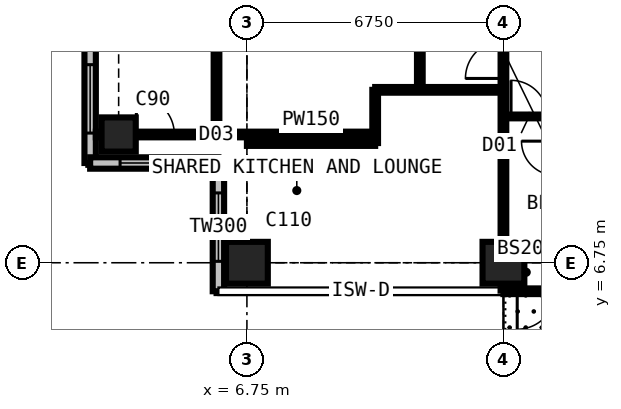
"""IFC4 building model, lengths in metres.
Left out: names, types, materials, properties, quantities, classifications, styles, units other than length and angle.
Written with IfcOpenShell. Run it as: python <this file> out.ifc"""

import sys

from ifc_helpers import new_model, si_unit, direction, frame, frame_2d, origin, origin_2d, place, context, subcontext, project, spatial, rectangle, extrude, element, fill, save


model = new_model("IFC4")
c1 = context("Model", 3, precision=1e-05, world=origin(), true_north=direction((0.0, 1.0)))
c2 = subcontext(c1, "Body", "Model", "MODEL_VIEW")
j1 = project(units=[si_unit("LENGTHUNIT", "METRE"), si_unit("PLANEANGLEUNIT", "RADIAN")], contexts=[c1])
p1 = place(None, origin())
s1 = spatial("IfcSite", under=j1, at=p1, CompositionType="ELEMENT")
p2 = place(p1, origin())
s2 = spatial("IfcBuilding", under=s1, at=p2, CompositionType="ELEMENT")
p3 = place(p2, frame((0.0, 0.0, 225.9)))
s3 = spatial("IfcBuildingStorey", under=s2, at=p3, CompositionType="ELEMENT", Elevation=225.9)
p4 = place(p3, frame((3.375, 10.125, 0.0), z_axis=(0.0, 0.0, 1.0), x_axis=(1.0, 0.0, 0.0)))
e1 = element("IfcColumn", 1, at=p4, inside=s3, PredefinedType="COLUMN", context=c2, shape_type="SweptSolid", body=[
    extrude(rectangle(XDim=0.9, YDim=0.9, at=origin_2d()), origin(), (0.0, 0.0, 1.0), 3.6),
])
for number, where, z_axis, x_axis in (
    (2, (6.75, 6.75, 0.0), (0.0, 0.0, 1.0), (1.0, 0.0, 0.0)),
    (3, (13.5, 6.75, 0.0), (0.0, 0.0, 1.0), (1.0, 0.0, 0.0)),
):
    element("IfcColumn", number, at=place(p3, frame(where, z_axis=z_axis, x_axis=x_axis)), inside=s3, PredefinedType="COLUMN", context=c2, shape_type="SweptSolid", body=[
        extrude(rectangle(XDim=1.1, YDim=1.1, at=origin_2d()), origin(), (0.0, 0.0, 1.0), 3.6),
    ])
p5 = place(p3, frame((2.625, 12.75, 0.0), z_axis=(0.0, 0.0, 1.0), x_axis=(0.0, -1.0, 0.0)))
e4 = element("IfcWall", 4, at=p5, inside=s3, PredefinedType="SOLIDWALL", context=c2, shape_type="SweptSolid", body=[
    extrude(rectangle(XDim=3.375, YDim=0.3, at=frame_2d((1.688, 0.0))), origin(), (0.0, 0.0, 1.0), 3.375),
])
p6 = place(p5, frame((0.788, 0.0, 0.6)))
e5 = element("IfcOpeningElement", 5, at=p6, cuts=e4, PredefinedType="OPENING", context=c2, shape_type="SweptSolid", body=[
    extrude(rectangle(XDim=1.8, YDim=2.1, at=frame_2d((0.9, 1.05))), frame((0.0, 0.16, 0.0), z_axis=(0.0, -1.0, 0.0), x_axis=(1.0, 0.0, 0.0)), (0.0, 0.0, 1.0), 0.32),
])
p7 = place(p3, frame((2.625, 9.375, 0.0), z_axis=(0.0, 0.0, 1.0), x_axis=(1.0, 0.0, 0.0)))
e6 = element("IfcWall", 6, at=p7, inside=s3, PredefinedType="SOLIDWALL", context=c2, shape_type="SweptSolid", body=[
    extrude(rectangle(XDim=3.375, YDim=0.3, at=frame_2d((1.688, 0.0))), origin(), (0.0, 0.0, 1.0), 3.375),
])
p8 = place(p7, frame((0.788, 0.0, 0.6)))
e7 = element("IfcOpeningElement", 7, at=p8, cuts=e6, PredefinedType="OPENING", context=c2, shape_type="SweptSolid", body=[
    extrude(rectangle(XDim=1.8, YDim=2.1, at=frame_2d((0.9, 1.05))), frame((0.0, 0.16, 0.0), z_axis=(0.0, -1.0, 0.0), x_axis=(1.0, 0.0, 0.0)), (0.0, 0.0, 1.0), 0.32),
])
p9 = place(p3, frame((6.0, 9.375, 0.0), z_axis=(0.0, 0.0, 1.0), x_axis=(0.0, -1.0, 0.0)))
e8 = element("IfcWall", 8, at=p9, inside=s3, PredefinedType="SOLIDWALL", context=c2, shape_type="SweptSolid", body=[
    extrude(rectangle(XDim=3.375, YDim=0.3, at=frame_2d((1.688, 0.0))), origin(), (0.0, 0.0, 1.0), 3.375),
])
p10 = place(p9, frame((0.788, 0.0, 0.6)))
e9 = element("IfcOpeningElement", 9, at=p10, cuts=e8, PredefinedType="OPENING", context=c2, shape_type="SweptSolid", body=[
    extrude(rectangle(XDim=1.8, YDim=2.1, at=frame_2d((0.9, 1.05))), frame((0.0, 0.16, 0.0), z_axis=(0.0, -1.0, 0.0), x_axis=(1.0, 0.0, 0.0)), (0.0, 0.0, 1.0), 0.32),
])
p11 = place(p3, frame((20.25, 6.0, 0.0), z_axis=(0.0, 0.0, 1.0), x_axis=(-1.0, 0.0, 0.0)))
e10 = element("IfcWall", 10, at=p11, inside=s3, PredefinedType="SOLIDWALL", context=c2, shape_type="SweptSolid", body=[
    extrude(rectangle(XDim=6.75, YDim=0.15, at=frame_2d((3.375, 0.0))), origin(), (0.0, 0.0, 1.0), 3.375),
])
p12 = place(p11, frame((0.363, 0.0, 0.0)))
e11 = element("IfcOpeningElement", 11, at=p12, cuts=e10, PredefinedType="OPENING", context=c2, shape_type="SweptSolid", body=[
    extrude(rectangle(XDim=1.0, YDim=2.2, at=frame_2d((0.5, 1.1))), frame((0.0, 0.085, 0.0), z_axis=(0.0, -1.0, 0.0), x_axis=(1.0, 0.0, 0.0)), (0.0, 0.0, 1.0), 0.17),
])
p13 = place(p11, frame((1.725, 0.0, 0.9)))
e12 = element("IfcOpeningElement", 12, at=p13, cuts=e10, PredefinedType="OPENING", context=c2, shape_type="SweptSolid", body=[
    extrude(rectangle(XDim=1.2, YDim=1.8, at=frame_2d((0.6, 0.9))), frame((0.0, 0.085, 0.0), z_axis=(0.0, -1.0, 0.0), x_axis=(1.0, 0.0, 0.0)), (0.0, 0.0, 1.0), 0.17),
])
p14 = place(p11, frame((5.387, 0.0, 0.0)))
e13 = element("IfcOpeningElement", 13, at=p14, cuts=e10, PredefinedType="OPENING", context=c2, shape_type="SweptSolid", body=[
    extrude(rectangle(XDim=1.0, YDim=2.2, at=frame_2d((0.5, 1.1))), frame((0.0, 0.085, 0.0), z_axis=(0.0, -1.0, 0.0), x_axis=(1.0, 0.0, 0.0)), (0.0, 0.0, 1.0), 0.17),
])
p15 = place(p11, frame((3.825, 0.0, 0.9)))
e14 = element("IfcOpeningElement", 14, at=p15, cuts=e10, PredefinedType="OPENING", context=c2, shape_type="SweptSolid", body=[
    extrude(rectangle(XDim=1.2, YDim=1.8, at=frame_2d((0.6, 0.9))), frame((0.0, 0.085, 0.0), z_axis=(0.0, -1.0, 0.0), x_axis=(1.0, 0.0, 0.0)), (0.0, 0.0, 1.0), 0.17),
])
p16 = place(p3, frame((2.775, 10.125, 0.0), z_axis=(0.0, 0.0, 1.0), x_axis=(1.0, 0.0, 0.0)))
e15 = element("IfcWall", 15, at=p16, inside=s3, PredefinedType="PARTITIONING", context=c2, shape_type="SweptSolid", body=[
    extrude(rectangle(XDim=7.35, YDim=0.15, at=frame_2d((3.675, 0.0))), origin(), (0.0, 0.0, 1.0), 2.877),
])
p17 = place(p16, frame((1.066, 0.0, 0.0)))
e16 = element("IfcOpeningElement", 16, at=p17, cuts=e15, PredefinedType="OPENING", context=c2, shape_type="SweptSolid", body=[
    extrude(rectangle(XDim=1.0, YDim=2.2, at=frame_2d((0.5, 1.1))), frame((0.0, 0.085, 0.0), z_axis=(0.0, -1.0, 0.0), x_axis=(1.0, 0.0, 0.0)), (0.0, 0.0, 1.0), 0.17),
])
p18 = place(p3, frame((5.95, 10.125, 0.0), z_axis=(0.0, 0.0, 1.0), x_axis=(0.0, 1.0, 0.0)))
e17 = element("IfcWall", 17, at=p18, inside=s3, PredefinedType="PARTITIONING", context=c2, shape_type="SweptSolid", body=[
    extrude(rectangle(XDim=2.65, YDim=0.15, at=frame_2d((1.325, 0.0))), origin(), (0.0, 0.0, 1.0), 3.375),
])
p19 = place(p3, frame((6.75, 9.9, 0.0), z_axis=(0.0, 0.0, 1.0), x_axis=(1.0, 0.0, 0.0)))
e18 = element("IfcWall", 18, at=p19, inside=s3, PredefinedType="PARTITIONING", context=c2, shape_type="SweptSolid", body=[
    extrude(rectangle(XDim=3.375, YDim=0.15, at=frame_2d((1.688, 0.0))), origin(), (0.0, 0.0, 1.0), 3.375),
])
p20 = place(p3, frame((10.125, 9.9, 0.0), z_axis=(0.0, 0.0, 1.0), x_axis=(0.0, 1.0, 0.0)))
e19 = element("IfcWall", 19, at=p20, inside=s3, PredefinedType="PARTITIONING", context=c2, shape_type="SweptSolid", body=[
    extrude(rectangle(XDim=1.4, YDim=0.15, at=frame_2d((0.7, 0.0))), origin(), (0.0, 0.0, 1.0), 3.375),
])
p21 = place(p3, frame((10.125, 11.3, 0.0), z_axis=(0.0, 0.0, 1.0), x_axis=(1.0, 0.0, 0.0)))
e20 = element("IfcWall", 20, at=p21, inside=s3, PredefinedType="PARTITIONING", context=c2, shape_type="SweptSolid", body=[
    extrude(rectangle(XDim=3.375, YDim=0.15, at=frame_2d((1.688, 0.0))), origin(), (0.0, 0.0, 1.0), 3.375),
])
p22 = place(p3, frame((11.3, 11.3, 0.0), z_axis=(0.0, 0.0, 1.0), x_axis=(0.0, 1.0, 0.0)))
e21 = element("IfcWall", 21, at=p22, inside=s3, PredefinedType="PARTITIONING", context=c2, shape_type="SweptSolid", body=[
    extrude(rectangle(XDim=19.3, YDim=0.15, at=frame_2d((9.65, 0.0))), origin(), (0.0, 0.0, 1.0), 3.375),
])
p23 = place(p22, frame((18.1, 0.0, 0.0)))
e22 = element("IfcOpeningElement", 22, at=p23, cuts=e21, PredefinedType="OPENING", context=c2, shape_type="SweptSolid", body=[
    extrude(rectangle(XDim=1.0, YDim=2.2, at=frame_2d((0.5, 1.1))), frame((0.0, 0.085, 0.0), z_axis=(0.0, -1.0, 0.0), x_axis=(1.0, 0.0, 0.0)), (0.0, 0.0, 1.0), 0.17),
])
p24 = place(p22, frame((10.137, 0.0, 0.0)))
e23 = element("IfcOpeningElement", 23, at=p24, cuts=e21, PredefinedType="OPENING", context=c2, shape_type="SweptSolid", body=[
    extrude(rectangle(XDim=1.0, YDim=2.2, at=frame_2d((0.5, 1.1))), frame((0.0, 0.085, 0.0), z_axis=(0.0, -1.0, 0.0), x_axis=(1.0, 0.0, 0.0)), (0.0, 0.0, 1.0), 0.17),
])
p25 = place(p3, frame((13.5, 6.016, 0.0), z_axis=(0.0, 0.0, 1.0), x_axis=(0.0, 1.0, 0.0)))
e24 = element("IfcWall", 24, at=p25, inside=s3, PredefinedType="PARTITIONING", context=c2, shape_type="SweptSolid", body=[
    extrude(rectangle(XDim=6.884, YDim=0.15, at=frame_2d((3.442, 0.0))), origin(), (0.0, 0.0, 1.0), 2.877),
])
p26 = place(p25, frame((5.584, 0.0, 0.0)))
e25 = element("IfcOpeningElement", 25, at=p26, cuts=e24, PredefinedType="OPENING", context=c2, shape_type="SweptSolid", body=[
    extrude(rectangle(XDim=1.0, YDim=2.2, at=frame_2d((0.5, 1.1))), frame((0.0, 0.085, 0.0), z_axis=(0.0, -1.0, 0.0), x_axis=(1.0, 0.0, 0.0)), (0.0, 0.0, 1.0), 0.17),
])
p27 = place(p3, frame((13.5, 10.6, 0.0), z_axis=(0.0, 0.0, 1.0), x_axis=(1.0, 0.0, 0.0)))
e26 = element("IfcWall", 26, at=p27, inside=s3, PredefinedType="PARTITIONING", context=c2, shape_type="SweptSolid", body=[
    extrude(rectangle(XDim=10.125, YDim=0.1, at=frame_2d((5.062, 0.0))), origin(), (0.0, 0.0, 1.0), 3.375),
])
p28 = place(p27, frame((0.2, 0.0, 0.0)))
e27 = element("IfcOpeningElement", 27, at=p28, cuts=e26, PredefinedType="OPENING", context=c2, shape_type="SweptSolid", body=[
    extrude(rectangle(XDim=0.95, YDim=2.2, at=frame_2d((0.475, 1.1))), frame((0.0, 0.06, 0.0), z_axis=(0.0, -1.0, 0.0), x_axis=(1.0, 0.0, 0.0)), (0.0, 0.0, 1.0), 0.12),
])
p29 = place(p27, frame((3.625, 0.0, 0.0)))
e28 = element("IfcOpeningElement", 28, at=p29, cuts=e26, PredefinedType="OPENING", context=c2, shape_type="SweptSolid", body=[
    extrude(rectangle(XDim=0.95, YDim=2.2, at=frame_2d((0.475, 1.1))), frame((0.0, 0.06, 0.0), z_axis=(0.0, -1.0, 0.0), x_axis=(1.0, 0.0, 0.0)), (0.0, 0.0, 1.0), 0.12),
])
p30 = place(p27, frame((6.95, 0.0, 0.0)))
e29 = element("IfcOpeningElement", 29, at=p30, cuts=e26, PredefinedType="OPENING", context=c2, shape_type="SweptSolid", body=[
    extrude(rectangle(XDim=0.95, YDim=2.2, at=frame_2d((0.475, 1.1))), frame((0.0, 0.06, 0.0), z_axis=(0.0, -1.0, 0.0), x_axis=(1.0, 0.0, 0.0)), (0.0, 0.0, 1.0), 0.12),
])
p31 = place(p6, origin())
e30 = element("IfcWindow", 30, at=p31, inside=s3, PartitioningType="SINGLE_PANEL", PredefinedType="WINDOW", context=c2, shape_type="SweptSolid", body=[
    extrude(rectangle(XDim=1.8, YDim=2.1, at=frame_2d((0.9, 1.05))), frame((0.0, 0.03, 0.0), z_axis=(0.0, -1.0, 0.0), x_axis=(1.0, 0.0, 0.0)), (0.0, 0.0, 1.0), 0.06),
])
fill(e5, e30)
p32 = place(p8, origin())
e31 = element("IfcWindow", 31, at=p32, inside=s3, PartitioningType="SINGLE_PANEL", PredefinedType="WINDOW", context=c2, shape_type="SweptSolid", body=[
    extrude(rectangle(XDim=1.8, YDim=2.1, at=frame_2d((0.9, 1.05))), frame((0.0, 0.03, 0.0), z_axis=(0.0, -1.0, 0.0), x_axis=(1.0, 0.0, 0.0)), (0.0, 0.0, 1.0), 0.06),
])
fill(e7, e31)
p33 = place(p10, origin())
e32 = element("IfcWindow", 32, at=p33, inside=s3, PartitioningType="SINGLE_PANEL", PredefinedType="WINDOW", context=c2, shape_type="SweptSolid", body=[
    extrude(rectangle(XDim=1.8, YDim=2.1, at=frame_2d((0.9, 1.05))), frame((0.0, 0.03, 0.0), z_axis=(0.0, -1.0, 0.0), x_axis=(1.0, 0.0, 0.0)), (0.0, 0.0, 1.0), 0.06),
])
fill(e9, e32)
p34 = place(p14, origin())
e33 = element("IfcDoor", 33, at=p34, inside=s3, OperationType="SINGLE_SWING_RIGHT", PredefinedType="DOOR", context=c2, shape_type="SweptSolid", body=[
    extrude(rectangle(XDim=1.0, YDim=2.2, at=frame_2d((0.5, 1.1))), frame((0.0, 0.025, 0.0), z_axis=(0.0, -1.0, 0.0), x_axis=(1.0, 0.0, 0.0)), (0.0, 0.0, 1.0), 0.05),
])
fill(e13, e33)
p35 = place(p17, origin())
e34 = element("IfcDoor", 34, at=p35, inside=s3, OperationType="SINGLE_SWING_LEFT", PredefinedType="DOOR", context=c2, shape_type="SweptSolid", body=[
    extrude(rectangle(XDim=1.0, YDim=2.2, at=frame_2d((0.5, 1.1))), frame((0.0, 0.025, 0.0), z_axis=(0.0, -1.0, 0.0), x_axis=(1.0, 0.0, 0.0)), (0.0, 0.0, 1.0), 0.05),
])
fill(e16, e34)
p36 = place(p28, origin())
e35 = element("IfcDoor", 35, at=p36, inside=s3, OperationType="SINGLE_SWING_LEFT", PredefinedType="DOOR", context=c2, shape_type="SweptSolid", body=[
    extrude(rectangle(XDim=0.95, YDim=2.2, at=frame_2d((0.475, 1.1))), frame((0.0, 0.025, 0.0), z_axis=(0.0, -1.0, 0.0), x_axis=(1.0, 0.0, 0.0)), (0.0, 0.0, 1.0), 0.05),
])
fill(e27, e35)
p37 = place(p26, origin())
e36 = element("IfcDoor", 36, at=p37, inside=s3, OperationType="SINGLE_SWING_LEFT", PredefinedType="DOOR", context=c2, shape_type="SweptSolid", body=[
    extrude(rectangle(XDim=1.0, YDim=2.2, at=frame_2d((0.5, 1.1))), frame((0.0, 0.025, 0.0), z_axis=(0.0, -1.0, 0.0), x_axis=(1.0, 0.0, 0.0)), (0.0, 0.0, 1.0), 0.05),
])
fill(e25, e36)
save(model, sys.argv[1])
